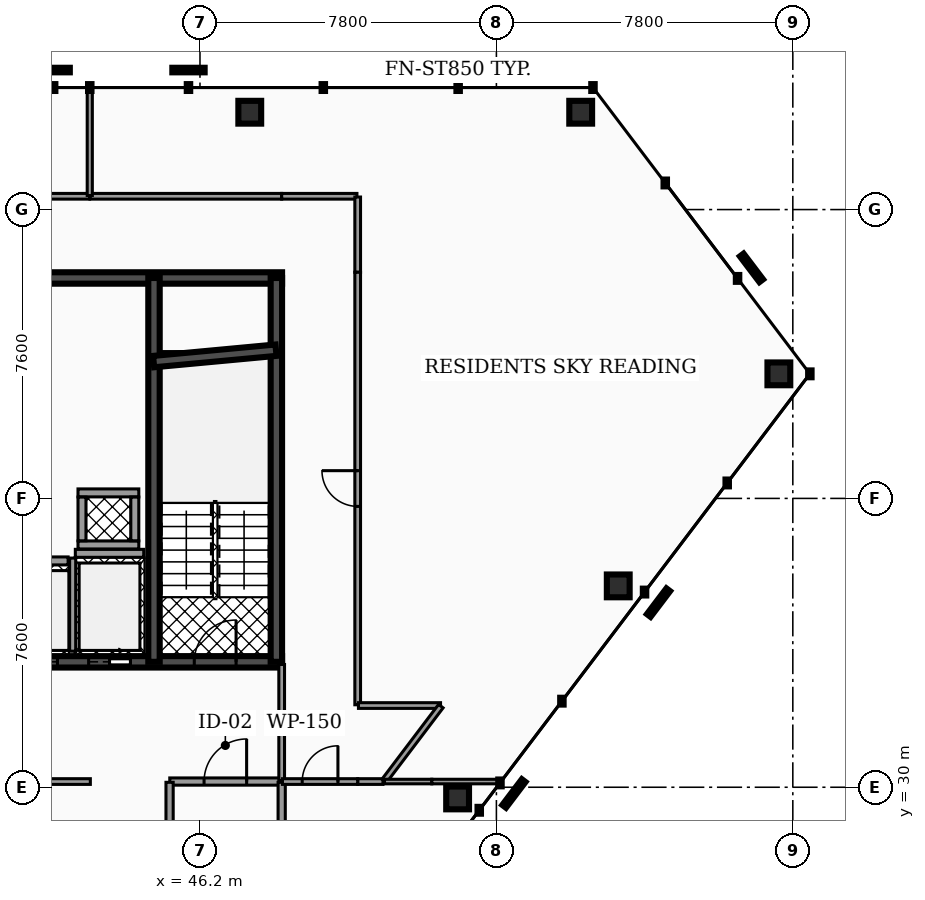
"""IFC4 building model, lengths in metres.
Left out: names, types, materials, properties, quantities, classifications, styles, units other than length and angle.
Written with IfcOpenShell. Run it as: python <this file> out.ifc"""

import sys

from ifc_helpers import new_model, si_unit, direction, frame, frame_2d, origin, origin_2d, place, context, subcontext, project, spatial, rectangle, hollow_rectangle, extrude, element, fill, save


model = new_model("IFC4")
c1 = context("Model", 3, precision=1e-05, world=origin(), true_north=direction((0.0, 1.0)))
c2 = subcontext(c1, "Body", "Model", "MODEL_VIEW")
j1 = project(units=[si_unit("LENGTHUNIT", "METRE"), si_unit("PLANEANGLEUNIT", "RADIAN")], contexts=[c1])
p1 = place(None, origin())
s1 = spatial("IfcSite", under=j1, at=p1, CompositionType="ELEMENT")
p2 = place(p1, origin())
s2 = spatial("IfcBuilding", under=s1, at=p2, CompositionType="ELEMENT")
p3 = place(p2, frame((0.0, 0.0, 215.56)))
s3 = spatial("IfcBuildingStorey", under=s2, at=p3, CompositionType="ELEMENT", Elevation=215.56)
p4 = place(p3, frame((28.5, 43.4, 0.0), z_axis=(0.0, 0.0, 1.0), x_axis=(1.0, 0.0, 0.0)))
e1 = element("IfcWall", 1, at=p4, inside=s3, PredefinedType="SHEAR", context=c2, shape_type="SweptSolid", body=[
    extrude(rectangle(XDim=19.86, YDim=0.3, at=frame_2d((9.93, 0.0))), origin(), (0.0, 0.0, 1.0), 3.18),
])
p5 = place(p3, frame((28.5, 33.3, 0.0), z_axis=(0.0, 0.0, 1.0), x_axis=(1.0, 0.0, 0.0)))
e2 = element("IfcWall", 2, at=p5, inside=s3, PredefinedType="SHEAR", context=c2, shape_type="SweptSolid", body=[
    extrude(rectangle(XDim=19.86, YDim=0.3, at=frame_2d((9.93, 0.0))), origin(), (0.0, 0.0, 1.0), 3.18),
])
p6 = place(p5, frame((3.93, 0.0, 0.0)))
e3 = element("IfcOpeningElement", 3, at=p6, cuts=e2, PredefinedType="OPENING", context=c2, shape_type="SweptSolid", body=[
    extrude(rectangle(XDim=1.1, YDim=2.15, at=frame_2d((0.55, 1.075))), frame((0.0, 0.16, 0.0), z_axis=(0.0, -1.0, 0.0), x_axis=(1.0, 0.0, 0.0)), (0.0, 0.0, 1.0), 0.32),
])
p7 = place(p5, frame((14.77, 0.0, 0.0)))
e4 = element("IfcOpeningElement", 4, at=p7, cuts=e2, PredefinedType="OPENING", context=c2, shape_type="SweptSolid", body=[
    extrude(rectangle(XDim=1.1, YDim=2.15, at=frame_2d((0.55, 1.075))), frame((0.0, 0.16, 0.0), z_axis=(0.0, -1.0, 0.0), x_axis=(1.0, 0.0, 0.0)), (0.0, 0.0, 1.0), 0.32),
])
p8 = place(p5, frame((11.25, 0.0, 0.0)))
e5 = element("IfcOpeningElement", 5, at=p8, cuts=e2, PredefinedType="OPENING", context=c2, shape_type="SweptSolid", body=[
    extrude(rectangle(XDim=1.0, YDim=2.1, at=frame_2d((0.5, 1.05))), frame((0.0, 0.16, 0.0), z_axis=(0.0, -1.0, 0.0), x_axis=(1.0, 0.0, 0.0)), (0.0, 0.0, 1.0), 0.32),
])
p9 = place(p5, frame((12.95, 0.0, 0.0)))
e6 = element("IfcOpeningElement", 6, at=p9, cuts=e2, PredefinedType="OPENING", context=c2, shape_type="SweptSolid", body=[
    extrude(rectangle(XDim=1.0, YDim=2.1, at=frame_2d((0.5, 1.05))), frame((0.0, 0.16, 0.0), z_axis=(0.0, -1.0, 0.0), x_axis=(1.0, 0.0, 0.0)), (0.0, 0.0, 1.0), 0.32),
])
p10 = place(p5, frame((5.85, 0.0, 0.0)))
e7 = element("IfcOpeningElement", 7, at=p10, cuts=e2, PredefinedType="OPENING", context=c2, shape_type="SweptSolid", body=[
    extrude(rectangle(XDim=1.0, YDim=2.1, at=frame_2d((0.5, 1.05))), frame((0.0, 0.16, 0.0), z_axis=(0.0, -1.0, 0.0), x_axis=(1.0, 0.0, 0.0)), (0.0, 0.0, 1.0), 0.32),
])
p11 = place(p5, frame((1.21, 0.0, 0.0)))
e8 = element("IfcOpeningElement", 8, at=p11, cuts=e2, PredefinedType="OPENING", context=c2, shape_type="SweptSolid", body=[
    extrude(rectangle(XDim=1.1, YDim=2.2, at=frame_2d((0.55, 1.1))), frame((0.0, 0.16, 0.0), z_axis=(0.0, -1.0, 0.0), x_axis=(1.0, 0.0, 0.0)), (0.0, 0.0, 1.0), 0.32),
])
p12 = place(p5, frame((9.34, 0.0, 0.0)))
e9 = element("IfcOpeningElement", 9, at=p12, cuts=e2, PredefinedType="OPENING", context=c2, shape_type="SweptSolid", body=[
    extrude(rectangle(XDim=1.12, YDim=2.05, at=frame_2d((0.56, 1.025))), frame((0.0, 0.16, 0.0), z_axis=(0.0, -1.0, 0.0), x_axis=(1.0, 0.0, 0.0)), (0.0, 0.0, 1.0), 0.32),
])
p13 = place(p5, frame((17.55, 0.0, 0.0)))
e10 = element("IfcOpeningElement", 10, at=p13, cuts=e2, PredefinedType="OPENING", context=c2, shape_type="SweptSolid", body=[
    extrude(rectangle(XDim=1.1, YDim=2.2, at=frame_2d((0.55, 1.1))), frame((0.0, 0.16, 0.0), z_axis=(0.0, -1.0, 0.0), x_axis=(1.0, 0.0, 0.0)), (0.0, 0.0, 1.0), 0.32),
])
for number, where, z_axis, x_axis in (
    (11, (44.99, 33.3, 0.0), (0.0, 0.0, 1.0), (0.0, 1.0, 0.0)),
    (12, (48.21, 33.3, 0.0), (0.0, 0.0, 1.0), (0.0, 1.0, 0.0)),
):
    element("IfcWall", number, at=place(p3, frame(where, z_axis=z_axis, x_axis=x_axis)), inside=s3, PredefinedType="SHEAR", context=c2, shape_type="SweptSolid", body=[
        extrude(rectangle(XDim=10.1, YDim=0.3, at=frame_2d((5.05, 0.0))), origin(), (0.0, 0.0, 1.0), 3.18),
    ])
p14 = place(p3, frame((44.98, 41.2, 0.0), z_axis=(0.0, 0.0, 1.0), x_axis=(0.995686468965, 0.09278176286, 0.0)))
e13 = element("IfcWall", 13, at=p14, inside=s3, PredefinedType="SHEAR", context=c2, shape_type="SweptSolid", body=[
    extrude(rectangle(XDim=3.234, YDim=0.3, at=frame_2d((1.617, 0.0))), origin(), (0.0, 0.0, 1.0), 3.18),
])
p15 = place(p3, frame((56.218, 47.761, 0.0), z_axis=(0.06217916272, -0.036603004655, 0.997393589198), x_axis=(0.507298382802, 0.86177047455, 0.0)))
e14 = element("IfcColumn", 14, at=p15, inside=s3, PredefinedType="COLUMN", context=c2, shape_type="SweptSolid", body=[
    extrude(hollow_rectangle(XDim=0.6, YDim=0.6, WallThickness=0.03, at=origin_2d()), origin(), (0.0, 0.0, 1.0), 3.188),
])
p16 = place(p3, frame((47.51, 47.761, 0.0), z_axis=(0.028069839988, -0.036659517798, 0.998933513222), x_axis=(0.793980498852, 0.607943227154, 0.0)))
e15 = element("IfcColumn", 15, at=p16, inside=s3, PredefinedType="COLUMN", context=c2, shape_type="SweptSolid", body=[
    extrude(hollow_rectangle(XDim=0.6, YDim=0.6, WallThickness=0.03, at=origin_2d()), origin(), (0.0, 0.0, 1.0), 3.183),
])
p17 = place(p3, frame((52.979, 29.719, 0.0), z_axis=(-0.08294530644, 0.094446446268, 0.992068518262), x_axis=(-0.751374273421, -0.659876277222, 0.0)))
e16 = element("IfcColumn", 16, at=p17, inside=s3, PredefinedType="COLUMN", context=c2, shape_type="SweptSolid", body=[
    extrude(hollow_rectangle(XDim=0.6, YDim=0.6, WallThickness=0.03, at=origin_2d()), origin(), (0.0, 0.0, 1.0), 3.205),
])
p18 = place(p3, frame((57.206, 35.298, 0.0), z_axis=(-0.071473484837, 0.109455666875, 0.991418679446), x_axis=(-0.837297704248, -0.546747249158, 0.0)))
e17 = element("IfcColumn", 17, at=p18, inside=s3, PredefinedType="COLUMN", context=c2, shape_type="SweptSolid", body=[
    extrude(hollow_rectangle(XDim=0.6, YDim=0.6, WallThickness=0.03, at=origin_2d()), origin(), (0.0, 0.0, 1.0), 3.208),
])
p19 = place(p3, frame((61.433, 40.878, 0.0), z_axis=(-0.059995859094, 0.124326019795, 0.99042593751), x_axis=(-0.900618554783, -0.43461042185, 0.0)))
e18 = element("IfcColumn", 18, at=p19, inside=s3, PredefinedType="COLUMN", context=c2, shape_type="SweptSolid", body=[
    extrude(hollow_rectangle(XDim=0.6, YDim=0.6, WallThickness=0.03, at=origin_2d()), origin(), (0.0, 0.0, 1.0), 3.211),
])
p20 = place(p3, frame((42.92, 36.155, 0.0), z_axis=(0.0, 0.0, 1.0), x_axis=(1.0, 0.0, 0.0)))
e19 = element("IfcWall", 19, at=p20, inside=s3, PredefinedType="SOLIDWALL", context=c2, shape_type="SweptSolid", body=[
    extrude(rectangle(XDim=1.8, YDim=0.21, at=frame_2d((0.9, 0.0))), origin(), (0.0, 0.0, 1.0), 3.18),
])
p21 = place(p3, frame((42.85, 33.58, 0.0), z_axis=(0.0, 0.0, 1.0), x_axis=(0.0, 1.0, 0.0)))
e20 = element("IfcWall", 20, at=p21, inside=s3, PredefinedType="SOLIDWALL", context=c2, shape_type="SweptSolid", body=[
    extrude(rectangle(XDim=2.45, YDim=0.16, at=frame_2d((1.225, 0.0))), origin(), (0.0, 0.0, 1.0), 3.18),
])
p22 = place(p3, frame((41.17, 35.955, 0.0), z_axis=(0.0, 0.0, 1.0), x_axis=(1.0, 0.0, 0.0)))
e21 = element("IfcWall", 21, at=p22, inside=s3, PredefinedType="SOLIDWALL", context=c2, shape_type="SweptSolid", body=[
    extrude(rectangle(XDim=1.56, YDim=0.21, at=frame_2d((0.78, 0.0))), origin(), (0.0, 0.0, 1.0), 3.18),
])
for number, where, z_axis, x_axis in (
    (22, (42.99, 36.375, 0.0), (0.0, 0.0, 1.0), (1.0, 0.0, 0.0)),
    (23, (42.99, 37.745, 0.0), (0.0, 0.0, 1.0), (1.0, 0.0, 0.0)),
):
    element("IfcWall", number, at=place(p3, frame(where, z_axis=z_axis, x_axis=x_axis)), inside=s3, PredefinedType="SOLIDWALL", context=c2, shape_type="SweptSolid", body=[
        extrude(rectangle(XDim=1.6, YDim=0.21, at=frame_2d((0.8, 0.0))), origin(), (0.0, 0.0, 1.0), 3.18),
    ])
for number, where, z_axis, x_axis in (
    (24, (43.095, 36.485, 0.0), (0.0, 0.0, 1.0), (0.0, 1.0, 0.0)),
    (25, (44.485, 36.485, 0.0), (0.0, 0.0, 1.0), (0.0, 1.0, 0.0)),
):
    element("IfcWall", number, at=place(p3, frame(where, z_axis=z_axis, x_axis=x_axis)), inside=s3, PredefinedType="SOLIDWALL", context=c2, shape_type="SweptSolid", body=[
        extrude(rectangle(XDim=1.15, YDim=0.21, at=frame_2d((0.575, 0.0))), origin(), (0.0, 0.0, 1.0), 3.18),
    ])
p23 = place(p3, frame((45.405, 30.15, 0.0), z_axis=(0.0, 0.0, 1.0), x_axis=(1.0, 0.0, 0.0)))
e26 = element("IfcWall", 26, at=p23, inside=s3, PredefinedType="PARTITIONING", context=c2, shape_type="SweptSolid", body=[
    extrude(rectangle(XDim=2.925, YDim=0.19, at=frame_2d((1.462, 0.0))), origin(), (0.0, 0.0, 1.0), 2.235),
])
p24 = place(p23, frame((0.903, 0.0, 0.0)))
e27 = element("IfcOpeningElement", 27, at=p24, cuts=e26, PredefinedType="OPENING", context=c2, shape_type="SweptSolid", body=[
    extrude(rectangle(XDim=1.12, YDim=2.05, at=frame_2d((0.56, 1.025))), frame((0.0, 0.105, 0.0), z_axis=(0.0, -1.0, 0.0), x_axis=(1.0, 0.0, 0.0)), (0.0, 0.0, 1.0), 0.21),
])
p25 = place(p3, frame((48.35, 30.17, 0.0), z_axis=(0.0, 0.0, 1.0), x_axis=(0.0, 1.0, 0.0)))
e28 = element("IfcWall", 28, at=p25, inside=s3, PredefinedType="PARTITIONING", context=c2, shape_type="SweptSolid", body=[
    extrude(rectangle(XDim=3.06, YDim=0.15, at=frame_2d((1.53, 0.0))), origin(), (0.0, 0.0, 1.0), 2.235),
])
p26 = place(p3, frame((33.485, 30.15, 0.0), z_axis=(0.0, 0.0, 1.0), x_axis=(1.0, 0.0, 0.0)))
e29 = element("IfcWall", 29, at=p26, inside=s3, PredefinedType="PARTITIONING", context=c2, shape_type="SweptSolid", body=[
    extrude(rectangle(XDim=9.83, YDim=0.15, at=frame_2d((4.915, 0.0))), origin(), (0.0, 0.0, 1.0), 2.235),
])
p27 = place(p26, frame((0.445, 0.0, 0.0)))
e30 = element("IfcOpeningElement", 30, at=p27, cuts=e29, PredefinedType="OPENING", context=c2, shape_type="SweptSolid", body=[
    extrude(rectangle(XDim=0.94, YDim=2.05, at=frame_2d((0.47, 1.025))), frame((0.0, 0.085, 0.0), z_axis=(0.0, -1.0, 0.0), x_axis=(1.0, 0.0, 0.0)), (0.0, 0.0, 1.0), 0.17),
])
for number, where, z_axis, x_axis in (
    (31, (45.4, 27.37, 0.0), (0.0, 0.0, 1.0), (0.0, 1.0, 0.0)),
    (32, (48.35, 27.37, 0.0), (0.0, 0.0, 1.0), (0.0, 1.0, 0.0)),
):
    element("IfcWall", number, at=place(p3, frame(where, z_axis=z_axis, x_axis=x_axis)), inside=s3, PredefinedType="PARTITIONING", context=c2, shape_type="SweptSolid", body=[
        extrude(rectangle(XDim=2.76, YDim=0.19, at=frame_2d((1.38, 0.0))), origin(), (0.0, 0.0, 1.0), 2.235),
    ])
p28 = place(p3, frame((50.35, 30.15, 0.0), z_axis=(0.0, 0.0, 1.0), x_axis=(1.0, 0.0, 0.0)))
e33 = element("IfcWall", 33, at=p28, inside=s3, PredefinedType="PARTITIONING", context=c2, shape_type="SweptSolid", body=[
    extrude(rectangle(XDim=0.665, YDim=0.15, at=frame_2d((0.333, 0.0))), origin(), (0.0, 0.0, 1.0), 2.235),
])
p29 = place(p3, frame((48.37, 30.15, 0.0), z_axis=(0.0, 0.0, 1.0), x_axis=(1.0, 0.0, 0.0)))
e34 = element("IfcWall", 34, at=p29, inside=s3, PredefinedType="PARTITIONING", context=c2, shape_type="SweptSolid", body=[
    extrude(rectangle(XDim=1.98, YDim=0.15, at=frame_2d((0.99, 0.0))), origin(), (0.0, 0.0, 1.0), 2.235),
])
p30 = place(p29, frame((0.52, 0.0, 0.0)))
e35 = element("IfcOpeningElement", 35, at=p30, cuts=e34, PredefinedType="OPENING", context=c2, shape_type="SweptSolid", body=[
    extrude(rectangle(XDim=0.94, YDim=2.05, at=frame_2d((0.47, 1.025))), frame((0.0, 0.085, 0.0), z_axis=(0.0, -1.0, 0.0), x_axis=(1.0, 0.0, 0.0)), (0.0, 0.0, 1.0), 0.17),
])
p31 = place(p3, frame((43.305, 45.55, 0.0), z_axis=(0.0, 0.0, 1.0), x_axis=(1.0, 0.0, 0.0)))
e36 = element("IfcWall", 36, at=p31, inside=s3, PredefinedType="PARTITIONING", context=c2, shape_type="SweptSolid", body=[
    extrude(rectangle(XDim=5.045, YDim=0.15, at=frame_2d((2.522, 0.0))), origin(), (0.0, 0.0, 1.0), 2.235),
])
for number, where, z_axis, x_axis in (
    (37, (48.35, 45.55, 0.0), (0.0, 0.0, 1.0), (1.0, 0.0, 0.0)),
    (38, (50.35, 43.55, 0.0), (0.0, 0.0, 1.0), (0.0, 1.0, 0.0)),
):
    element("IfcWall", number, at=place(p3, frame(where, z_axis=z_axis, x_axis=x_axis)), inside=s3, PredefinedType="PARTITIONING", context=c2, shape_type="SweptSolid", body=[
        extrude(rectangle(XDim=1.98, YDim=0.15, at=frame_2d((0.99, 0.0))), origin(), (0.0, 0.0, 1.0), 2.235),
    ])
p32 = place(p3, frame((50.35, 32.17, 0.0), z_axis=(0.0, 0.0, 1.0), x_axis=(0.0, 1.0, 0.0)))
e39 = element("IfcWall", 39, at=p32, inside=s3, PredefinedType="PARTITIONING", context=c2, shape_type="SweptSolid", body=[
    extrude(rectangle(XDim=11.38, YDim=0.15, at=frame_2d((5.69, 0.0))), origin(), (0.0, 0.0, 1.0), 2.235),
])
p33 = place(p32, frame((5.22, 0.0, 0.0)))
e40 = element("IfcOpeningElement", 40, at=p33, cuts=e39, PredefinedType="OPENING", context=c2, shape_type="SweptSolid", body=[
    extrude(rectangle(XDim=0.94, YDim=2.05, at=frame_2d((0.47, 1.025))), frame((0.0, 0.085, 0.0), z_axis=(0.0, -1.0, 0.0), x_axis=(1.0, 0.0, 0.0)), (0.0, 0.0, 1.0), 0.17),
])
p34 = place(p3, frame((50.37, 32.15, 0.0), z_axis=(0.0, 0.0, 1.0), x_axis=(1.0, 0.0, 0.0)))
e41 = element("IfcWall", 41, at=p34, inside=s3, PredefinedType="PARTITIONING", context=c2, shape_type="SweptSolid", body=[
    extrude(rectangle(XDim=2.16, YDim=0.15, at=frame_2d((1.08, 0.0))), origin(), (0.0, 0.0, 1.0), 2.235),
])
p35 = place(p3, frame((51.047, 30.166, 0.0), z_axis=(0.0, 0.0, 1.0), x_axis=(0.603806281462, 0.797131089889, 0.0)))
e42 = element("IfcWall", 42, at=p35, inside=s3, PredefinedType="PARTITIONING", context=c2, shape_type="SweptSolid", body=[
    extrude(rectangle(XDim=2.469, YDim=0.15, at=frame_2d((1.234, 0.0))), origin(), (0.0, 0.0, 1.0), 2.235),
])
p36 = place(p3, frame((40.894, 45.55, 0.0), z_axis=(0.0, 0.0, 1.0), x_axis=(1.0, 0.0, 0.0)))
e43 = element("IfcWall", 43, at=p36, inside=s3, PredefinedType="PARTITIONING", context=c2, shape_type="SweptSolid", body=[
    extrude(rectangle(XDim=2.401, YDim=0.15, at=frame_2d((1.2, 0.0))), origin(), (0.0, 0.0, 1.0), 2.235),
])
p37 = place(p3, frame((51.055, 30.15, 0.0), z_axis=(0.0, 0.0, 1.0), x_axis=(1.0, 0.0, 0.0)))
e44 = element("IfcWall", 44, at=p37, inside=s3, PredefinedType="PARTITIONING", context=c2, shape_type="SweptSolid", body=[
    extrude(rectangle(XDim=1.245, YDim=0.12, at=frame_2d((0.623, 0.0))), origin(), (0.0, 0.0, 1.0), 2.235),
])
p38 = place(p3, frame((52.3, 30.15, 0.0), z_axis=(0.0, 0.0, 1.0), x_axis=(1.0, 0.0, 0.0)))
e45 = element("IfcWall", 45, at=p38, inside=s3, PredefinedType="PARTITIONING", context=c2, shape_type="SweptSolid", body=[
    extrude(rectangle(XDim=1.806, YDim=0.12, at=frame_2d((0.903, 0.0))), origin(), (0.0, 0.0, 1.0), 2.235),
])
p39 = place(p3, frame((43.3, 45.57, 0.0), z_axis=(0.0, 0.0, 1.0), x_axis=(0.0, 1.0, 0.0)))
e46 = element("IfcWall", 46, at=p39, inside=s3, PredefinedType="PARTITIONING", context=c2, shape_type="SweptSolid", body=[
    extrude(rectangle(XDim=2.826, YDim=0.135, at=frame_2d((1.413, 0.0))), origin(), (0.0, 0.0, 1.0), 2.235),
])
p40 = place(p7, origin())
e47 = element("IfcDoor", 47, at=p40, inside=s3, OperationType="SLIDING_TO_RIGHT", PredefinedType="DOOR", context=c2, shape_type="SweptSolid", body=[
    extrude(rectangle(XDim=1.1, YDim=2.15, at=frame_2d((0.55, 1.075))), frame((0.0, 0.025, 0.0), z_axis=(0.0, -1.0, 0.0), x_axis=(1.0, 0.0, 0.0)), (0.0, 0.0, 1.0), 0.05),
])
fill(e4, e47)
p41 = place(p9, origin())
e48 = element("IfcDoor", 48, at=p41, inside=s3, OperationType="SLIDING_TO_LEFT", PredefinedType="DOOR", context=c2, shape_type="SweptSolid", body=[
    extrude(rectangle(XDim=1.0, YDim=2.1, at=frame_2d((0.5, 1.05))), frame((0.0, 0.025, 0.0), z_axis=(0.0, -1.0, 0.0), x_axis=(1.0, 0.0, 0.0)), (0.0, 0.0, 1.0), 0.05),
])
fill(e6, e48)
p42 = place(p13, origin())
e49 = element("IfcDoor", 49, at=p42, inside=s3, OperationType="SINGLE_SWING_RIGHT", PredefinedType="DOOR", context=c2, shape_type="SweptSolid", body=[
    extrude(rectangle(XDim=1.1, YDim=2.2, at=frame_2d((0.55, 1.1))), frame((0.0, 0.025, 0.0), z_axis=(0.0, -1.0, 0.0), x_axis=(1.0, 0.0, 0.0)), (0.0, 0.0, 1.0), 0.05),
])
fill(e10, e49)
p43 = place(p24, origin())
e50 = element("IfcDoor", 50, at=p43, inside=s3, OperationType="SINGLE_SWING_RIGHT", PredefinedType="DOOR", context=c2, shape_type="SweptSolid", body=[
    extrude(rectangle(XDim=1.12, YDim=2.05, at=frame_2d((0.56, 1.025))), frame((0.0, 0.025, 0.0), z_axis=(0.0, -1.0, 0.0), x_axis=(1.0, 0.0, 0.0)), (0.0, 0.0, 1.0), 0.05),
])
fill(e27, e50)
p44 = place(p30, origin())
e51 = element("IfcDoor", 51, at=p44, inside=s3, OperationType="SINGLE_SWING_RIGHT", PredefinedType="DOOR", context=c2, shape_type="SweptSolid", body=[
    extrude(rectangle(XDim=0.94, YDim=2.05, at=frame_2d((0.47, 1.025))), frame((0.0, 0.025, 0.0), z_axis=(0.0, -1.0, 0.0), x_axis=(1.0, 0.0, 0.0)), (0.0, 0.0, 1.0), 0.05),
])
fill(e35, e51)
p45 = place(p33, origin())
e52 = element("IfcDoor", 52, at=p45, inside=s3, OperationType="SINGLE_SWING_RIGHT", PredefinedType="DOOR", context=c2, shape_type="SweptSolid", body=[
    extrude(rectangle(XDim=0.94, YDim=2.05, at=frame_2d((0.47, 1.025))), frame((0.0, 0.025, 0.0), z_axis=(0.0, -1.0, 0.0), x_axis=(1.0, 0.0, 0.0)), (0.0, 0.0, 1.0), 0.05),
])
fill(e40, e52)
save(model, sys.argv[1])
